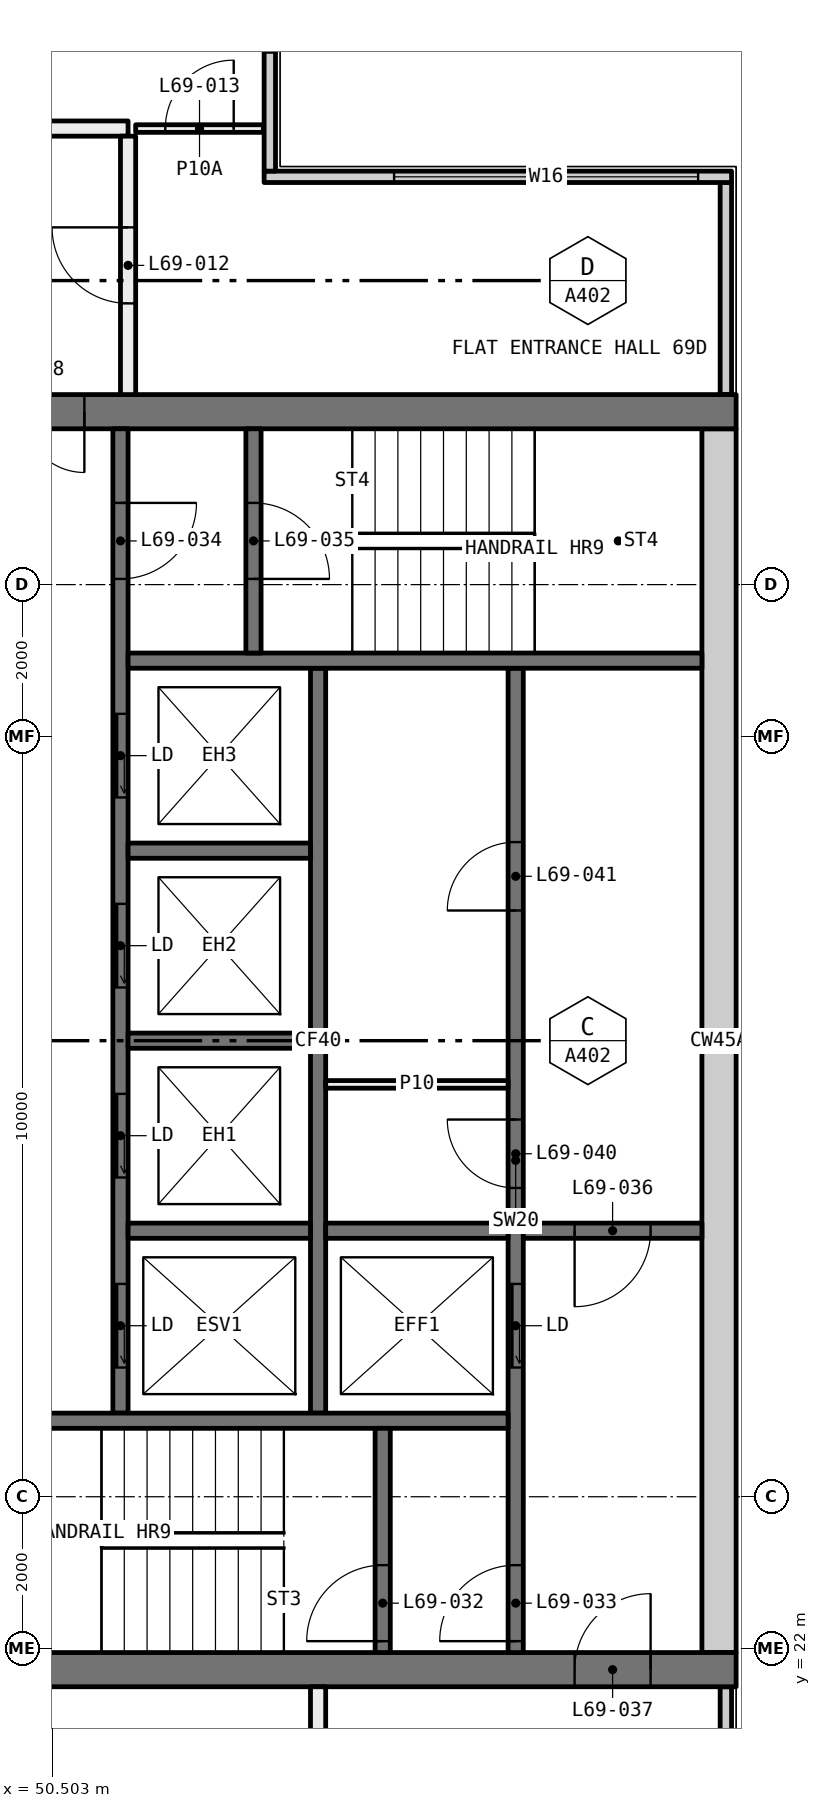
"""IFC4 building model, lengths in metres.
Left out: names, types, materials, properties, quantities, classifications, styles, units other than length and angle.
Written with IfcOpenShell. Run it as: python <this file> out.ifc"""

import sys

from ifc_helpers import new_model, si_unit, direction, frame, frame_2d, origin, place, context, subcontext, project, spatial, rectangle, extrude, element, fill, save


model = new_model("IFC4")
c1 = context("Model", 3, precision=1e-05, world=origin(), true_north=direction((0.0, 1.0)))
c2 = subcontext(c1, "Body", "Model", "MODEL_VIEW")
j1 = project(units=[si_unit("LENGTHUNIT", "METRE"), si_unit("PLANEANGLEUNIT", "RADIAN")], contexts=[c1])
p1 = place(None, origin())
s1 = spatial("IfcSite", under=j1, at=p1, CompositionType="ELEMENT")
p2 = place(p1, origin())
s2 = spatial("IfcBuilding", under=s1, at=p2, CompositionType="ELEMENT")
p3 = place(p2, frame((0.0, 0.0, 255.9)))
s3 = spatial("IfcBuildingStorey", under=s2, at=p3, CompositionType="ELEMENT", Elevation=255.9)
for number, where, z_axis, x_axis in (
    (1, (59.365, 18.71, 0.0), (0.0, 0.0, 1.0), (0.0, 1.0, 0.0)),
    (2, (59.365, 38.5, 0.0), (0.0, 0.0, 1.0), (0.0, 1.0, 0.0)),
):
    element("IfcWall", number, at=place(p3, frame(where, z_axis=z_axis, x_axis=x_axis)), inside=s3, PredefinedType="ELEMENTEDWALL", context=c2, shape_type="SweptSolid", body=[
        extrude(rectangle(XDim=2.79, YDim=0.15, at=frame_2d((1.395, 0.0))), origin(), (0.0, 0.0, 1.0), 3.05),
    ])
p4 = place(p3, frame((53.29, 41.365, 0.0), z_axis=(0.0, 0.0, 1.0), x_axis=(1.0, 0.0, 0.0)))
e3 = element("IfcWall", 3, at=p4, inside=s3, PredefinedType="ELEMENTEDWALL", context=c2, shape_type="SweptSolid", body=[
    extrude(rectangle(XDim=6.15, YDim=0.15, at=frame_2d((3.075, 0.0))), origin(), (0.0, 0.0, 1.0), 3.05),
])
p5 = place(p4, frame((1.71, 0.0, 0.45)))
e4 = element("IfcOpeningElement", 4, at=p5, cuts=e3, PredefinedType="OPENING", context=c2, shape_type="SweptSolid", body=[
    extrude(rectangle(XDim=4.0, YDim=2.55, at=frame_2d((2.0, 1.275))), frame((0.0, 0.085, 0.0), z_axis=(0.0, -1.0, 0.0), x_axis=(1.0, 0.0, 0.0)), (0.0, 0.0, 1.0), 0.17),
])
p6 = place(p3, frame((53.365, 41.44, 0.0), z_axis=(0.0, 0.0, 1.0), x_axis=(0.0, 1.0, 0.0)))
e5 = element("IfcWall", 5, at=p6, inside=s3, PredefinedType="ELEMENTEDWALL", context=c2, shape_type="SweptSolid", body=[
    extrude(rectangle(XDim=5.85, YDim=0.15, at=frame_2d((2.925, 0.0))), origin(), (0.0, 0.0, 1.0), 3.05),
])
p7 = place(p6, frame((1.56, 0.0, 0.45)))
e6 = element("IfcOpeningElement", 6, at=p7, cuts=e5, PredefinedType="OPENING", context=c2, shape_type="SweptSolid", body=[
    extrude(rectangle(XDim=4.0, YDim=2.55, at=frame_2d((2.0, 1.275))), frame((0.0, 0.085, 0.0), z_axis=(0.0, -1.0, 0.0), x_axis=(1.0, 0.0, 0.0)), (0.0, 0.0, 1.0), 0.17),
])
p8 = place(p3, frame((54.0, 18.72, 0.0), z_axis=(0.0, 0.0, 1.0), x_axis=(0.0, 1.0, 0.0)))
e7 = element("IfcWall", 7, at=p8, inside=s3, PredefinedType="PARTITIONING", context=c2, shape_type="SweptSolid", body=[
    extrude(rectangle(XDim=2.78, YDim=0.2, at=frame_2d((1.39, 0.0))), origin(), (0.0, 0.0, 1.0), 3.05),
])
p9 = place(p8, frame((0.89, 0.0, 0.0)))
e8 = element("IfcOpeningElement", 8, at=p9, cuts=e7, PredefinedType="OPENING", context=c2, shape_type="SweptSolid", body=[
    extrude(rectangle(XDim=1.0, YDim=2.1, at=frame_2d((0.5, 1.05))), frame((0.0, 0.11, 0.0), z_axis=(0.0, -1.0, 0.0), x_axis=(1.0, 0.0, 0.0)), (0.0, 0.0, 1.0), 0.22),
])
p10 = place(p3, frame((51.6, 42.0, 0.0), z_axis=(0.0, 0.0, 1.0), x_axis=(1.0, 0.0, 0.0)))
e9 = element("IfcWall", 9, at=p10, inside=s3, PredefinedType="PARTITIONING", context=c2, shape_type="SweptSolid", body=[
    extrude(rectangle(XDim=1.68, YDim=0.1, at=frame_2d((0.84, 0.0))), origin(), (0.0, 0.0, 1.0), 3.05),
])
p11 = place(p10, frame((0.39, 0.0, 0.0)))
e10 = element("IfcOpeningElement", 10, at=p11, cuts=e9, PredefinedType="OPENING", context=c2, shape_type="SweptSolid", body=[
    extrude(rectangle(XDim=0.9, YDim=2.1, at=frame_2d((0.45, 1.05))), frame((0.0, 0.06, 0.0), z_axis=(0.0, -1.0, 0.0), x_axis=(1.0, 0.0, 0.0)), (0.0, 0.0, 1.0), 0.12),
])
p12 = place(p3, frame((48.0, 42.0, 0.0), z_axis=(0.0, 0.0, 1.0), x_axis=(1.0, 0.0, 0.0)))
e11 = element("IfcWall", 11, at=p12, inside=s3, PredefinedType="PARTITIONING", context=c2, shape_type="SweptSolid", body=[
    extrude(rectangle(XDim=3.5, YDim=0.2, at=frame_2d((1.75, 0.0))), origin(), (0.0, 0.0, 1.0), 3.05),
])
p13 = place(p3, frame((51.5, 41.9, 0.0), z_axis=(0.0, 0.0, 1.0), x_axis=(0.0, -1.0, 0.0)))
e12 = element("IfcWall", 12, at=p13, inside=s3, PredefinedType="PARTITIONING", context=c2, shape_type="SweptSolid", body=[
    extrude(rectangle(XDim=3.4, YDim=0.2, at=frame_2d((1.7, 0.0))), origin(), (0.0, 0.0, 1.0), 3.05),
])
p14 = place(p13, frame((1.2, 0.0, 0.0)))
e13 = element("IfcOpeningElement", 13, at=p14, cuts=e12, PredefinedType="OPENING", context=c2, shape_type="SweptSolid", body=[
    extrude(rectangle(XDim=1.0, YDim=2.1, at=frame_2d((0.5, 1.05))), frame((0.0, 0.11, 0.0), z_axis=(0.0, -1.0, 0.0), x_axis=(1.0, 0.0, 0.0)), (0.0, 0.0, 1.0), 0.22),
])
p15 = place(p3, frame((59.5, 21.725, 0.0), z_axis=(0.0, 0.0, 1.0), x_axis=(-1.0, 0.0, 0.0)))
e14 = element("IfcWall", 14, at=p15, inside=s3, PredefinedType="SHEAR", context=c2, shape_type="SweptSolid", body=[
    extrude(rectangle(XDim=11.0, YDim=0.45, at=frame_2d((5.5, 0.0))), origin(), (0.0, 0.0, 1.0), 3.05),
])
p16 = place(p15, frame((1.125, 0.0, 0.0)))
e15 = element("IfcOpeningElement", 15, at=p16, cuts=e14, PredefinedType="OPENING", context=c2, shape_type="SweptSolid", body=[
    extrude(rectangle(XDim=1.0, YDim=2.1, at=frame_2d((0.5, 1.05))), frame((0.0, 0.235, 0.0), z_axis=(0.0, -1.0, 0.0), x_axis=(1.0, 0.0, 0.0)), (0.0, 0.0, 1.0), 0.47),
])
p17 = place(p3, frame((59.5, 38.275, 0.0), z_axis=(0.0, 0.0, 1.0), x_axis=(-1.0, 0.0, 0.0)))
e16 = element("IfcWall", 16, at=p17, inside=s3, PredefinedType="SHEAR", context=c2, shape_type="SweptSolid", body=[
    extrude(rectangle(XDim=11.0, YDim=0.45, at=frame_2d((5.5, 0.0))), origin(), (0.0, 0.0, 1.0), 3.05),
])
p18 = place(p17, frame((8.575, 0.0, 0.0)))
e17 = element("IfcOpeningElement", 17, at=p18, cuts=e16, PredefinedType="OPENING", context=c2, shape_type="SweptSolid", body=[
    extrude(rectangle(XDim=1.6, YDim=2.1, at=frame_2d((0.8, 1.05))), frame((0.0, 0.235, 0.0), z_axis=(0.0, -1.0, 0.0), x_axis=(1.0, 0.0, 0.0)), (0.0, 0.0, 1.0), 0.47),
])
p19 = place(p3, frame((59.275, 21.95, 0.0), z_axis=(0.0, 0.0, 1.0), x_axis=(0.0, 1.0, 0.0)))
e18 = element("IfcWall", 18, at=p19, inside=s3, PredefinedType="SHEAR", context=c2, shape_type="SweptSolid", body=[
    extrude(rectangle(XDim=16.1, YDim=0.45, at=frame_2d((8.05, 0.0))), origin(), (0.0, 0.0, 1.0), 3.05),
])
p20 = place(p3, frame((56.6, 21.95, 0.0), z_axis=(0.0, 0.0, 1.0), x_axis=(0.0, 1.0, 0.0)))
e19 = element("IfcWall", 19, at=p20, inside=s3, PredefinedType="SOLIDWALL", context=c2, shape_type="SweptSolid", body=[
    extrude(rectangle(XDim=12.95, YDim=0.2, at=frame_2d((6.475, 0.0))), origin(), (0.0, 0.0, 1.0), 3.05),
])
p21 = place(p20, frame((3.75, 0.0, 0.0)))
e20 = element("IfcOpeningElement", 20, at=p21, cuts=e19, PredefinedType="OPENING", context=c2, shape_type="SweptSolid", body=[
    extrude(rectangle(XDim=1.1, YDim=2.1, at=frame_2d((0.55, 1.05))), frame((0.0, 0.11, 0.0), z_axis=(0.0, -1.0, 0.0), x_axis=(1.0, 0.0, 0.0)), (0.0, 0.0, 1.0), 0.22),
])
p22 = place(p20, frame((0.15, 0.0, 0.0)))
e21 = element("IfcOpeningElement", 21, at=p22, cuts=e19, PredefinedType="OPENING", context=c2, shape_type="SweptSolid", body=[
    extrude(rectangle(XDim=1.0, YDim=2.1, at=frame_2d((0.5, 1.05))), frame((0.0, 0.11, 0.0), z_axis=(0.0, -1.0, 0.0), x_axis=(1.0, 0.0, 0.0)), (0.0, 0.0, 1.0), 0.22),
])
p23 = place(p20, frame((6.113, 0.0, 0.0)))
e22 = element("IfcOpeningElement", 22, at=p23, cuts=e19, PredefinedType="OPENING", context=c2, shape_type="SweptSolid", body=[
    extrude(rectangle(XDim=0.9, YDim=2.1, at=frame_2d((0.45, 1.05))), frame((0.0, 0.11, 0.0), z_axis=(0.0, -1.0, 0.0), x_axis=(1.0, 0.0, 0.0)), (0.0, 0.0, 1.0), 0.22),
])
p24 = place(p20, frame((9.762, 0.0, 0.0)))
e23 = element("IfcOpeningElement", 23, at=p24, cuts=e19, PredefinedType="OPENING", context=c2, shape_type="SweptSolid", body=[
    extrude(rectangle(XDim=0.9, YDim=2.1, at=frame_2d((0.45, 1.05))), frame((0.0, 0.11, 0.0), z_axis=(0.0, -1.0, 0.0), x_axis=(1.0, 0.0, 0.0)), (0.0, 0.0, 1.0), 0.22),
])
p25 = place(p3, frame((51.4, 25.1, 0.0), z_axis=(0.0, 0.0, 1.0), x_axis=(0.0, 1.0, 0.0)))
e24 = element("IfcWall", 24, at=p25, inside=s3, PredefinedType="SOLIDWALL", context=c2, shape_type="SweptSolid", body=[
    extrude(rectangle(XDim=12.95, YDim=0.2, at=frame_2d((6.475, 0.0))), origin(), (0.0, 0.0, 1.0), 3.05),
])
p26 = place(p25, frame((0.6, 0.0, 0.0)))
e25 = element("IfcOpeningElement", 25, at=p26, cuts=e24, PredefinedType="OPENING", context=c2, shape_type="SweptSolid", body=[
    extrude(rectangle(XDim=1.1, YDim=2.1, at=frame_2d((0.55, 1.05))), frame((0.0, 0.11, 0.0), z_axis=(0.0, -1.0, 0.0), x_axis=(1.0, 0.0, 0.0)), (0.0, 0.0, 1.0), 0.22),
])
p27 = place(p25, frame((3.1, 0.0, 0.0)))
e26 = element("IfcOpeningElement", 26, at=p27, cuts=e24, PredefinedType="OPENING", context=c2, shape_type="SweptSolid", body=[
    extrude(rectangle(XDim=1.1, YDim=2.1, at=frame_2d((0.55, 1.05))), frame((0.0, 0.11, 0.0), z_axis=(0.0, -1.0, 0.0), x_axis=(1.0, 0.0, 0.0)), (0.0, 0.0, 1.0), 0.22),
])
p28 = place(p25, frame((5.6, 0.0, 0.0)))
e27 = element("IfcOpeningElement", 27, at=p28, cuts=e24, PredefinedType="OPENING", context=c2, shape_type="SweptSolid", body=[
    extrude(rectangle(XDim=1.1, YDim=2.1, at=frame_2d((0.55, 1.05))), frame((0.0, 0.11, 0.0), z_axis=(0.0, -1.0, 0.0), x_axis=(1.0, 0.0, 0.0)), (0.0, 0.0, 1.0), 0.22),
])
p29 = place(p25, frame((8.1, 0.0, 0.0)))
e28 = element("IfcOpeningElement", 28, at=p29, cuts=e24, PredefinedType="OPENING", context=c2, shape_type="SweptSolid", body=[
    extrude(rectangle(XDim=1.1, YDim=2.1, at=frame_2d((0.55, 1.05))), frame((0.0, 0.11, 0.0), z_axis=(0.0, -1.0, 0.0), x_axis=(1.0, 0.0, 0.0)), (0.0, 0.0, 1.0), 0.22),
])
p30 = place(p25, frame((10.975, 0.0, 0.0)))
e29 = element("IfcOpeningElement", 29, at=p30, cuts=e24, PredefinedType="OPENING", context=c2, shape_type="SweptSolid", body=[
    extrude(rectangle(XDim=1.0, YDim=2.1, at=frame_2d((0.5, 1.05))), frame((0.0, 0.11, 0.0), z_axis=(0.0, -1.0, 0.0), x_axis=(1.0, 0.0, 0.0)), (0.0, 0.0, 1.0), 0.22),
])
p31 = place(p3, frame((54.0, 25.1, 0.0), z_axis=(0.0, 0.0, 1.0), x_axis=(0.0, 1.0, 0.0)))
e30 = element("IfcWall", 30, at=p31, inside=s3, PredefinedType="SOLIDWALL", context=c2, shape_type="SweptSolid", body=[
    extrude(rectangle(XDim=9.8, YDim=0.2, at=frame_2d((4.9, 0.0))), origin(), (0.0, 0.0, 1.0), 3.05),
])
for number, where, z_axis, x_axis in (
    (31, (56.5, 25.0, 0.0), (0.0, 0.0, 1.0), (-1.0, 0.0, 0.0)),
    (32, (59.05, 35.0, 0.0), (0.0, 0.0, 1.0), (-1.0, 0.0, 0.0)),
):
    element("IfcWall", number, at=place(p3, frame(where, z_axis=z_axis, x_axis=x_axis)), inside=s3, PredefinedType="SOLIDWALL", context=c2, shape_type="SweptSolid", body=[
        extrude(rectangle(XDim=7.55, YDim=0.2, at=frame_2d((3.775, 0.0))), origin(), (0.0, 0.0, 1.0), 3.05),
    ])
p32 = place(p3, frame((59.05, 27.5, 0.0), z_axis=(0.0, 0.0, 1.0), x_axis=(-1.0, 0.0, 0.0)))
e33 = element("IfcWall", 33, at=p32, inside=s3, PredefinedType="SOLIDWALL", context=c2, shape_type="SweptSolid", body=[
    extrude(rectangle(XDim=2.35, YDim=0.2, at=frame_2d((1.175, 0.0))), origin(), (0.0, 0.0, 1.0), 3.05),
])
p33 = place(p32, frame((0.675, 0.0, 0.0)))
e34 = element("IfcOpeningElement", 34, at=p33, cuts=e33, PredefinedType="OPENING", context=c2, shape_type="SweptSolid", body=[
    extrude(rectangle(XDim=1.0, YDim=2.1, at=frame_2d((0.5, 1.05))), frame((0.0, 0.11, 0.0), z_axis=(0.0, -1.0, 0.0), x_axis=(1.0, 0.0, 0.0)), (0.0, 0.0, 1.0), 0.22),
])
p34 = place(p3, frame((54.85, 21.95, 0.0), z_axis=(0.0, 0.0, 1.0), x_axis=(0.0, 1.0, 0.0)))
e35 = element("IfcWall", 35, at=p34, inside=s3, PredefinedType="SOLIDWALL", context=c2, shape_type="SweptSolid", body=[
    extrude(rectangle(XDim=2.95, YDim=0.2, at=frame_2d((1.475, 0.0))), origin(), (0.0, 0.0, 1.0), 3.05),
])
p35 = place(p34, frame((0.15, 0.0, 0.0)))
e36 = element("IfcOpeningElement", 36, at=p35, cuts=e35, PredefinedType="OPENING", context=c2, shape_type="SweptSolid", body=[
    extrude(rectangle(XDim=1.0, YDim=2.1, at=frame_2d((0.5, 1.05))), frame((0.0, 0.11, 0.0), z_axis=(0.0, -1.0, 0.0), x_axis=(1.0, 0.0, 0.0)), (0.0, 0.0, 1.0), 0.22),
])
p36 = place(p3, frame((53.15, 35.1, 0.0), z_axis=(0.0, 0.0, 1.0), x_axis=(0.0, 1.0, 0.0)))
e37 = element("IfcWall", 37, at=p36, inside=s3, PredefinedType="SOLIDWALL", context=c2, shape_type="SweptSolid", body=[
    extrude(rectangle(XDim=2.95, YDim=0.2, at=frame_2d((1.475, 0.0))), origin(), (0.0, 0.0, 1.0), 3.05),
])
p37 = place(p36, frame((0.975, 0.0, 0.0)))
e38 = element("IfcOpeningElement", 38, at=p37, cuts=e37, PredefinedType="OPENING", context=c2, shape_type="SweptSolid", body=[
    extrude(rectangle(XDim=1.0, YDim=2.1, at=frame_2d((0.5, 1.05))), frame((0.0, 0.11, 0.0), z_axis=(0.0, -1.0, 0.0), x_axis=(1.0, 0.0, 0.0)), (0.0, 0.0, 1.0), 0.22),
])
for number, where, z_axis, x_axis in (
    (39, (56.5, 27.5, 0.0), (0.0, 0.0, 1.0), (-1.0, 0.0, 0.0)),
    (40, (53.9, 27.5, 0.0), (0.0, 0.0, 1.0), (-1.0, 0.0, 0.0)),
    (41, (53.9, 30.0, 0.0), (0.0, 0.0, 1.0), (-1.0, 0.0, 0.0)),
    (42, (53.9, 32.5, 0.0), (0.0, 0.0, 1.0), (-1.0, 0.0, 0.0)),
):
    element("IfcWall", number, at=place(p3, frame(where, z_axis=z_axis, x_axis=x_axis)), inside=s3, PredefinedType="SOLIDWALL", context=c2, shape_type="SweptSolid", body=[
        extrude(rectangle(XDim=2.4, YDim=0.2, at=frame_2d((1.2, 0.0))), origin(), (0.0, 0.0, 1.0), 3.05),
    ])
p38 = place(p3, frame((56.5, 29.425, 0.0), z_axis=(0.0, 0.0, 1.0), x_axis=(-1.0, 0.0, 0.0)))
e43 = element("IfcWall", 43, at=p38, inside=s3, PredefinedType="PARTITIONING", context=c2, shape_type="SweptSolid", body=[
    extrude(rectangle(XDim=2.4, YDim=0.1, at=frame_2d((1.2, 0.0))), origin(), (0.0, 0.0, 1.0), 3.05),
])
p39 = place(p5, origin())
e44 = element("IfcWindow", 44, at=p39, inside=s3, PartitioningType="SINGLE_PANEL", PredefinedType="WINDOW", context=c2, shape_type="SweptSolid", body=[
    extrude(rectangle(XDim=4.0, YDim=2.55, at=frame_2d((2.0, 1.275))), frame((0.0, 0.03, 0.0), z_axis=(0.0, -1.0, 0.0), x_axis=(1.0, 0.0, 0.0)), (0.0, 0.0, 1.0), 0.06),
])
fill(e4, e44)
p40 = place(p14, frame((1.0, 0.0, 0.0), x_axis=(-1.0, 0.0, 0.0)))
e45 = element("IfcDoor", 45, at=p40, inside=s3, OperationType="SINGLE_SWING_LEFT", PredefinedType="DOOR", context=c2, shape_type="SweptSolid", body=[
    extrude(rectangle(XDim=1.0, YDim=2.1, at=frame_2d((0.5, 1.05))), frame((0.0, 0.025, 0.0), z_axis=(0.0, -1.0, 0.0), x_axis=(1.0, 0.0, 0.0)), (0.0, 0.0, 1.0), 0.05),
])
fill(e13, e45)
p41 = place(p11, origin())
e46 = element("IfcDoor", 46, at=p41, inside=s3, OperationType="SINGLE_SWING_LEFT", PredefinedType="DOOR", context=c2, shape_type="SweptSolid", body=[
    extrude(rectangle(XDim=0.9, YDim=2.1, at=frame_2d((0.45, 1.05))), frame((0.0, 0.025, 0.0), z_axis=(0.0, -1.0, 0.0), x_axis=(1.0, 0.0, 0.0)), (0.0, 0.0, 1.0), 0.05),
])
fill(e10, e46)
p42 = place(p26, origin())
e47 = element("IfcDoor", 47, at=p42, inside=s3, OperationType="SLIDING_TO_LEFT", PredefinedType="DOOR", context=c2, shape_type="SweptSolid", body=[
    extrude(rectangle(XDim=1.1, YDim=2.1, at=frame_2d((0.55, 1.05))), frame((0.0, 0.025, 0.0), z_axis=(0.0, -1.0, 0.0), x_axis=(1.0, 0.0, 0.0)), (0.0, 0.0, 1.0), 0.05),
])
fill(e25, e47)
p43 = place(p27, origin())
e48 = element("IfcDoor", 48, at=p43, inside=s3, OperationType="SLIDING_TO_LEFT", PredefinedType="DOOR", context=c2, shape_type="SweptSolid", body=[
    extrude(rectangle(XDim=1.1, YDim=2.1, at=frame_2d((0.55, 1.05))), frame((0.0, 0.025, 0.0), z_axis=(0.0, -1.0, 0.0), x_axis=(1.0, 0.0, 0.0)), (0.0, 0.0, 1.0), 0.05),
])
fill(e26, e48)
p44 = place(p28, origin())
e49 = element("IfcDoor", 49, at=p44, inside=s3, OperationType="SLIDING_TO_LEFT", PredefinedType="DOOR", context=c2, shape_type="SweptSolid", body=[
    extrude(rectangle(XDim=1.1, YDim=2.1, at=frame_2d((0.55, 1.05))), frame((0.0, 0.025, 0.0), z_axis=(0.0, -1.0, 0.0), x_axis=(1.0, 0.0, 0.0)), (0.0, 0.0, 1.0), 0.05),
])
fill(e27, e49)
p45 = place(p29, origin())
e50 = element("IfcDoor", 50, at=p45, inside=s3, OperationType="SLIDING_TO_LEFT", PredefinedType="DOOR", context=c2, shape_type="SweptSolid", body=[
    extrude(rectangle(XDim=1.1, YDim=2.1, at=frame_2d((0.55, 1.05))), frame((0.0, 0.025, 0.0), z_axis=(0.0, -1.0, 0.0), x_axis=(1.0, 0.0, 0.0)), (0.0, 0.0, 1.0), 0.05),
])
fill(e28, e50)
p46 = place(p21, origin())
e51 = element("IfcDoor", 51, at=p46, inside=s3, OperationType="SLIDING_TO_LEFT", PredefinedType="DOOR", context=c2, shape_type="SweptSolid", body=[
    extrude(rectangle(XDim=1.1, YDim=2.1, at=frame_2d((0.55, 1.05))), frame((0.0, 0.025, 0.0), z_axis=(0.0, -1.0, 0.0), x_axis=(1.0, 0.0, 0.0)), (0.0, 0.0, 1.0), 0.05),
])
fill(e20, e51)
p47 = place(p35, origin())
e52 = element("IfcDoor", 52, at=p47, inside=s3, OperationType="SINGLE_SWING_RIGHT", PredefinedType="DOOR", context=c2, shape_type="SweptSolid", body=[
    extrude(rectangle(XDim=1.0, YDim=2.1, at=frame_2d((0.5, 1.05))), frame((0.0, 0.025, 0.0), z_axis=(0.0, -1.0, 0.0), x_axis=(1.0, 0.0, 0.0)), (0.0, 0.0, 1.0), 0.05),
])
fill(e36, e52)
p48 = place(p22, origin())
e53 = element("IfcDoor", 53, at=p48, inside=s3, OperationType="SINGLE_SWING_RIGHT", PredefinedType="DOOR", context=c2, shape_type="SweptSolid", body=[
    extrude(rectangle(XDim=1.0, YDim=2.1, at=frame_2d((0.5, 1.05))), frame((0.0, 0.025, 0.0), z_axis=(0.0, -1.0, 0.0), x_axis=(1.0, 0.0, 0.0)), (0.0, 0.0, 1.0), 0.05),
])
fill(e21, e53)
p49 = place(p30, frame((1.0, 0.0, 0.0), x_axis=(-1.0, 0.0, 0.0)))
e54 = element("IfcDoor", 54, at=p49, inside=s3, OperationType="SINGLE_SWING_RIGHT", PredefinedType="DOOR", context=c2, shape_type="SweptSolid", body=[
    extrude(rectangle(XDim=1.0, YDim=2.1, at=frame_2d((0.5, 1.05))), frame((0.0, 0.025, 0.0), z_axis=(0.0, -1.0, 0.0), x_axis=(1.0, 0.0, 0.0)), (0.0, 0.0, 1.0), 0.05),
])
fill(e29, e54)
p50 = place(p37, frame((1.0, 0.0, 0.0), x_axis=(-1.0, 0.0, 0.0)))
e55 = element("IfcDoor", 55, at=p50, inside=s3, OperationType="SINGLE_SWING_LEFT", PredefinedType="DOOR", context=c2, shape_type="SweptSolid", body=[
    extrude(rectangle(XDim=1.0, YDim=2.1, at=frame_2d((0.5, 1.05))), frame((0.0, 0.025, 0.0), z_axis=(0.0, -1.0, 0.0), x_axis=(1.0, 0.0, 0.0)), (0.0, 0.0, 1.0), 0.05),
])
fill(e38, e55)
p51 = place(p33, origin())
e56 = element("IfcDoor", 56, at=p51, inside=s3, OperationType="SINGLE_SWING_LEFT", PredefinedType="DOOR", context=c2, shape_type="SweptSolid", body=[
    extrude(rectangle(XDim=1.0, YDim=2.1, at=frame_2d((0.5, 1.05))), frame((0.0, 0.025, 0.0), z_axis=(0.0, -1.0, 0.0), x_axis=(1.0, 0.0, 0.0)), (0.0, 0.0, 1.0), 0.05),
])
fill(e34, e56)
p52 = place(p16, frame((1.0, 0.0, 0.0), x_axis=(-1.0, 0.0, 0.0)))
e57 = element("IfcDoor", 57, at=p52, inside=s3, OperationType="SINGLE_SWING_LEFT", PredefinedType="DOOR", context=c2, shape_type="SweptSolid", body=[
    extrude(rectangle(XDim=1.0, YDim=2.1, at=frame_2d((0.5, 1.05))), frame((0.0, 0.025, 0.0), z_axis=(0.0, -1.0, 0.0), x_axis=(1.0, 0.0, 0.0)), (0.0, 0.0, 1.0), 0.05),
])
fill(e15, e57)
p53 = place(p18, origin())
e58 = element("IfcDoor", 58, at=p53, inside=s3, OperationType="DOUBLE_DOOR_SINGLE_SWING", PredefinedType="DOOR", context=c2, shape_type="SweptSolid", body=[
    extrude(rectangle(XDim=1.6, YDim=2.1, at=frame_2d((0.8, 1.05))), frame((0.0, 0.025, 0.0), z_axis=(0.0, -1.0, 0.0), x_axis=(1.0, 0.0, 0.0)), (0.0, 0.0, 1.0), 0.05),
])
fill(e17, e58)
p54 = place(p23, origin())
e59 = element("IfcDoor", 59, at=p54, inside=s3, OperationType="SINGLE_SWING_LEFT", PredefinedType="DOOR", context=c2, shape_type="SweptSolid", body=[
    extrude(rectangle(XDim=0.9, YDim=2.1, at=frame_2d((0.45, 1.05))), frame((0.0, 0.025, 0.0), z_axis=(0.0, -1.0, 0.0), x_axis=(1.0, 0.0, 0.0)), (0.0, 0.0, 1.0), 0.05),
])
fill(e22, e59)
p55 = place(p24, origin())
e60 = element("IfcDoor", 60, at=p55, inside=s3, OperationType="SINGLE_SWING_RIGHT", PredefinedType="DOOR", context=c2, shape_type="SweptSolid", body=[
    extrude(rectangle(XDim=0.9, YDim=2.1, at=frame_2d((0.45, 1.05))), frame((0.0, 0.025, 0.0), z_axis=(0.0, -1.0, 0.0), x_axis=(1.0, 0.0, 0.0)), (0.0, 0.0, 1.0), 0.05),
])
fill(e23, e60)
save(model, sys.argv[1])
